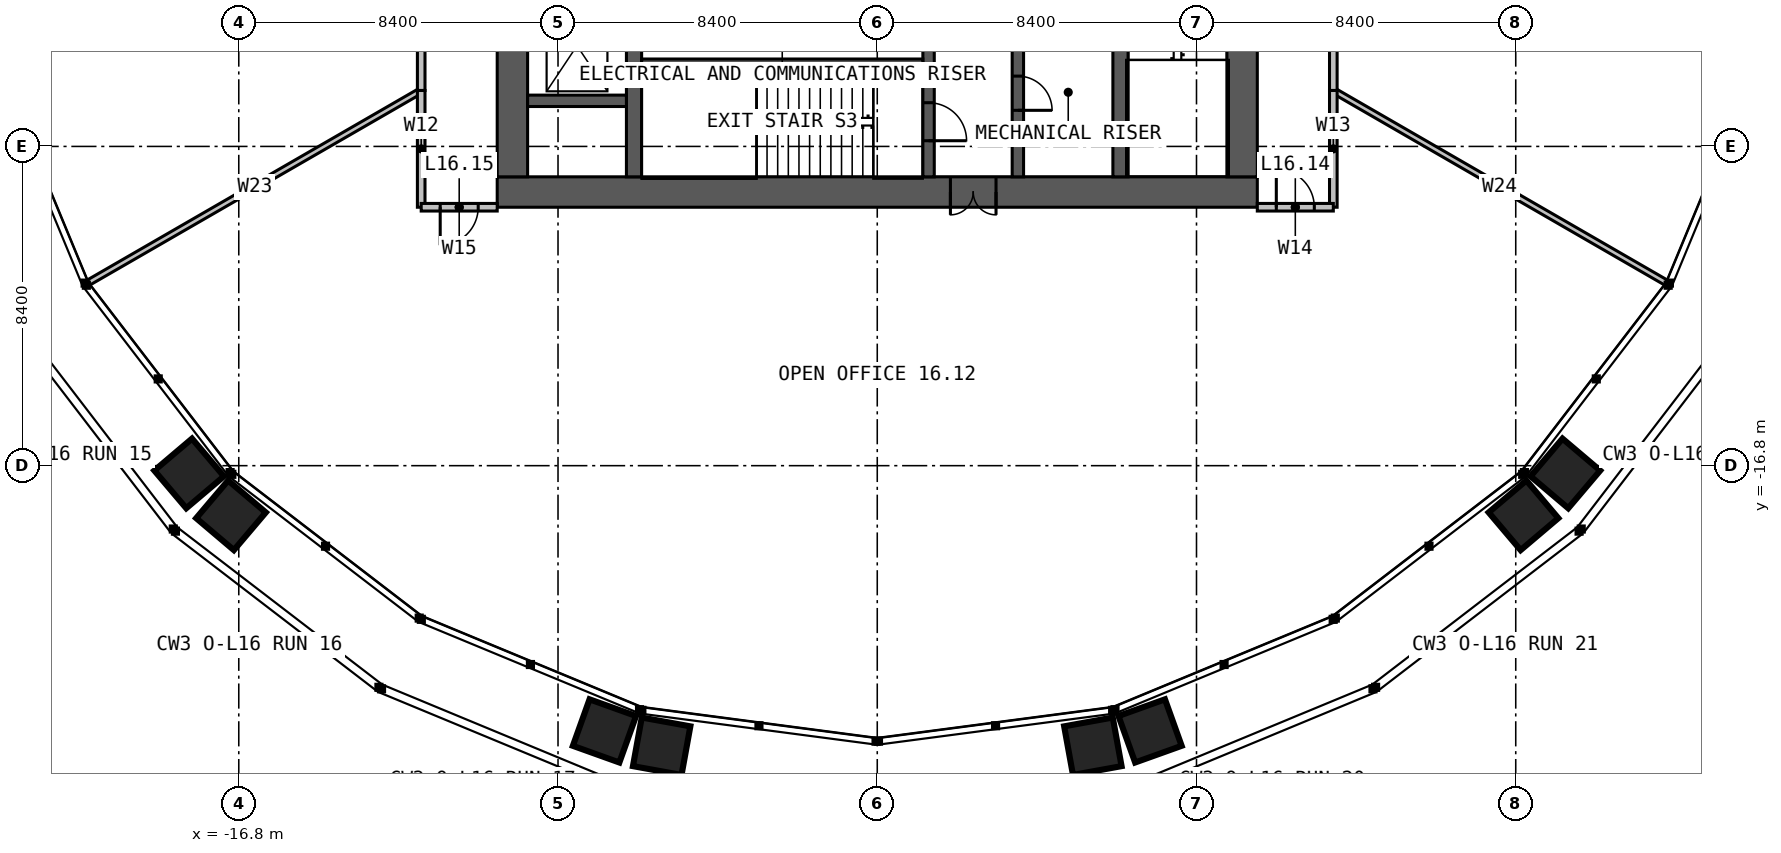
"""IFC4 building model, lengths in metres.
Left out: names, types, materials, properties, quantities, classifications, styles, units other than length and angle.
Written with IfcOpenShell. Run it as: python <this file> out.ifc"""

import sys

from ifc_helpers import new_model, si_unit, direction, frame, frame_2d, origin, place, context, subcontext, project, spatial, rectangle, extrude, element, fill, save


model = new_model("IFC4")
c1 = context("Model", 3, precision=1e-05, world=origin(), true_north=direction((0.0, 1.0)))
c2 = subcontext(c1, "Body", "Model", "MODEL_VIEW")
j1 = project(units=[si_unit("LENGTHUNIT", "METRE"), si_unit("PLANEANGLEUNIT", "RADIAN")], contexts=[c1])
p1 = place(None, origin())
s1 = spatial("IfcSite", under=j1, at=p1, CompositionType="ELEMENT")
p2 = place(p1, origin())
s2 = spatial("IfcBuilding", under=s1, at=p2, CompositionType="ELEMENT")
p3 = place(p2, frame((0.0, 0.0, 69.0)))
s3 = spatial("IfcBuildingStorey", under=s2, at=p3, CompositionType="ELEMENT", Elevation=69.0)
p4 = place(p3, frame((10.0, -9.6, 0.0), z_axis=(0.0, 0.0, 1.0), x_axis=(-1.0, 0.0, 0.0)))
e1 = element("IfcWall", 1, at=p4, inside=s3, PredefinedType="SOLIDWALL", context=c2, shape_type="SweptSolid", body=[
    extrude(rectangle(XDim=20.0, YDim=0.8, at=frame_2d((10.0, 0.0))), origin(), (0.0, 0.0, 1.0), 4.0),
])
p5 = place(p4, frame((6.875, 0.0, 0.0)))
e2 = element("IfcOpeningElement", 2, at=p5, cuts=e1, PredefinedType="OPENING", context=c2, shape_type="SweptSolid", body=[
    extrude(rectangle(XDim=1.2, YDim=2.2, at=frame_2d((0.6, 1.1))), frame((0.0, 0.41, 0.0), z_axis=(0.0, -1.0, 0.0), x_axis=(1.0, 0.0, 0.0)), (0.0, 0.0, 1.0), 0.82),
])
for number, where, z_axis, x_axis in (
    (3, (9.6, -9.2, 0.0), (0.0, 0.0, 1.0), (0.0, 1.0, 0.0)),
    (4, (-9.6, 9.2, 0.0), (0.0, 0.0, 1.0), (0.0, -1.0, 0.0)),
):
    element("IfcWall", number, at=place(p3, frame(where, z_axis=z_axis, x_axis=x_axis)), inside=s3, PredefinedType="SOLIDWALL", context=c2, shape_type="SweptSolid", body=[
        extrude(rectangle(XDim=18.4, YDim=0.8, at=frame_2d((9.2, 0.0))), origin(), (0.0, 0.0, 1.0), 4.0),
    ])
p6 = place(p3, frame((-6.4, -9.2, 0.0), z_axis=(0.0, 0.0, 1.0), x_axis=(0.0, 1.0, 0.0)))
e5 = element("IfcWall", 5, at=p6, inside=s3, PredefinedType="SOLIDWALL", context=c2, shape_type="SweptSolid", body=[
    extrude(rectangle(XDim=18.4, YDim=0.4, at=frame_2d((9.2, 0.0))), origin(), (0.0, 0.0, 1.0), 4.0),
])
p7 = place(p6, frame((8.7, 0.0, 0.0)))
e6 = element("IfcOpeningElement", 6, at=p7, cuts=e5, PredefinedType="OPENING", context=c2, shape_type="SweptSolid", body=[
    extrude(rectangle(XDim=1.0, YDim=2.2, at=frame_2d((0.5, 1.1))), frame((0.0, 0.21, 0.0), z_axis=(0.0, -1.0, 0.0), x_axis=(1.0, 0.0, 0.0)), (0.0, 0.0, 1.0), 0.42),
])
p8 = place(p3, frame((6.4, 9.2, 0.0), z_axis=(0.0, 0.0, 1.0), x_axis=(0.0, -1.0, 0.0)))
e7 = element("IfcWall", 7, at=p8, inside=s3, PredefinedType="SOLIDWALL", context=c2, shape_type="SweptSolid", body=[
    extrude(rectangle(XDim=18.4, YDim=0.4, at=frame_2d((9.2, 0.0))), origin(), (0.0, 0.0, 1.0), 4.0),
])
p9 = place(p8, frame((8.7, 0.0, 0.0)))
e8 = element("IfcOpeningElement", 8, at=p9, cuts=e7, PredefinedType="OPENING", context=c2, shape_type="SweptSolid", body=[
    extrude(rectangle(XDim=1.0, YDim=2.2, at=frame_2d((0.5, 1.1))), frame((0.0, 0.21, 0.0), z_axis=(0.0, -1.0, 0.0), x_axis=(1.0, 0.0, 0.0)), (0.0, 0.0, 1.0), 0.42),
])
p10 = place(p3, frame((1.35, -1.45, 0.0), z_axis=(0.0, 0.0, 1.0), x_axis=(0.0, -1.0, 0.0)))
e9 = element("IfcWall", 9, at=p10, inside=s3, PredefinedType="SOLIDWALL", context=c2, shape_type="SweptSolid", body=[
    extrude(rectangle(XDim=7.75, YDim=0.3, at=frame_2d((3.875, 0.0))), origin(), (0.0, 0.0, 1.0), 4.0),
])
p11 = place(p10, frame((5.8, 0.0, 0.0)))
e10 = element("IfcOpeningElement", 10, at=p11, cuts=e9, PredefinedType="OPENING", context=c2, shape_type="SweptSolid", body=[
    extrude(rectangle(XDim=1.0, YDim=2.2, at=frame_2d((0.5, 1.1))), frame((0.0, 0.16, 0.0), z_axis=(0.0, -1.0, 0.0), x_axis=(1.0, 0.0, 0.0)), (0.0, 0.0, 1.0), 0.32),
])
p12 = place(p10, frame((3.525, 0.0, 0.0)))
e11 = element("IfcOpeningElement", 11, at=p12, cuts=e9, PredefinedType="OPENING", context=c2, shape_type="SweptSolid", body=[
    extrude(rectangle(XDim=0.9, YDim=2.2, at=frame_2d((0.45, 1.1))), frame((0.0, 0.16, 0.0), z_axis=(0.0, -1.0, 0.0), x_axis=(1.0, 0.0, 0.0)), (0.0, 0.0, 1.0), 0.32),
])
p13 = place(p3, frame((3.7, -1.45, 0.0), z_axis=(0.0, 0.0, 1.0), x_axis=(0.0, -1.0, 0.0)))
e12 = element("IfcWall", 12, at=p13, inside=s3, PredefinedType="SOLIDWALL", context=c2, shape_type="SweptSolid", body=[
    extrude(rectangle(XDim=7.75, YDim=0.3, at=frame_2d((3.875, 0.0))), origin(), (0.0, 0.0, 1.0), 4.0),
])
p14 = place(p13, frame((5.1, 0.0, 0.0)))
e13 = element("IfcOpeningElement", 13, at=p14, cuts=e12, PredefinedType="OPENING", context=c2, shape_type="SweptSolid", body=[
    extrude(rectangle(XDim=0.9, YDim=2.2, at=frame_2d((0.45, 1.1))), frame((0.0, 0.16, 0.0), z_axis=(0.0, -1.0, 0.0), x_axis=(1.0, 0.0, 0.0)), (0.0, 0.0, 1.0), 0.32),
])
p15 = place(p3, frame((-6.2, -6.2, 0.0), z_axis=(0.0, 0.0, 1.0), x_axis=(1.0, 0.0, 0.0)))
e14 = element("IfcWall", 14, at=p15, inside=s3, PredefinedType="SOLIDWALL", context=c2, shape_type="SweptSolid", body=[
    extrude(rectangle(XDim=7.4, YDim=0.2, at=frame_2d((3.7, 0.0))), origin(), (0.0, 0.0, 1.0), 4.0),
])
p16 = place(p3, frame((-9.2, -7.2, 0.0), z_axis=(0.0, 0.0, 1.0), x_axis=(1.0, 0.0, 0.0)))
e15 = element("IfcWall", 15, at=p16, inside=s3, PredefinedType="SOLIDWALL", context=c2, shape_type="SweptSolid", body=[
    extrude(rectangle(XDim=2.6, YDim=0.3, at=frame_2d((1.3, 0.0))), origin(), (0.0, 0.0, 1.0), 4.0),
])
for number, where, z_axis, x_axis in (
    (16, (12.0, -6.928, 0.0), (0.0, 0.0, 1.0), (0.866, -0.5, 0.0)),
    (17, (-12.0, -6.928, 0.0), (0.0, 0.0, 1.0), (-0.866, -0.5, 0.0)),
):
    element("IfcWall", number, at=place(p3, frame(where, z_axis=z_axis, x_axis=x_axis)), inside=s3, PredefinedType="PARTITIONING", context=c2, shape_type="SweptSolid", body=[
        extrude(rectangle(XDim=10.106, YDim=0.15, at=frame_2d((5.053, 0.0))), origin(), (0.0, 0.0, 1.0), 2.79),
    ])
p17 = place(p3, frame((12.0, -6.928, 0.0), z_axis=(0.0, 0.0, 1.0), x_axis=(0.0, 1.0, 0.0)))
e18 = element("IfcWall", 18, at=p17, inside=s3, PredefinedType="PARTITIONING", context=c2, shape_type="SweptSolid", body=[
    extrude(rectangle(XDim=10.144, YDim=0.2, at=frame_2d((5.072, 0.0))), origin(), (0.0, 0.0, 1.0), 3.8),
])
p18 = place(p17, frame((4.172, 0.0, 0.0)))
e19 = element("IfcOpeningElement", 19, at=p18, cuts=e18, PredefinedType="OPENING", context=c2, shape_type="SweptSolid", body=[
    extrude(rectangle(XDim=1.8, YDim=2.2, at=frame_2d((0.9, 1.1))), frame((0.0, 0.11, 0.0), z_axis=(0.0, -1.0, 0.0), x_axis=(1.0, 0.0, 0.0)), (0.0, 0.0, 1.0), 0.22),
])
p19 = place(p3, frame((-12.0, 6.928, 0.0), z_axis=(0.0, 0.0, 1.0), x_axis=(0.0, -1.0, 0.0)))
e20 = element("IfcWall", 20, at=p19, inside=s3, PredefinedType="PARTITIONING", context=c2, shape_type="SweptSolid", body=[
    extrude(rectangle(XDim=13.856, YDim=0.2, at=frame_2d((6.928, 0.0))), origin(), (0.0, 0.0, 1.0), 3.8),
])
p20 = place(p19, frame((6.028, 0.0, 0.0)))
e21 = element("IfcOpeningElement", 21, at=p20, cuts=e20, PredefinedType="OPENING", context=c2, shape_type="SweptSolid", body=[
    extrude(rectangle(XDim=1.8, YDim=2.2, at=frame_2d((0.9, 1.1))), frame((0.0, 0.11, 0.0), z_axis=(0.0, -1.0, 0.0), x_axis=(1.0, 0.0, 0.0)), (0.0, 0.0, 1.0), 0.22),
])
for number, where, z_axis, x_axis in (
    (22, (-12.0, -6.928, 0.0), (0.0, 0.0, 1.0), (0.0, -1.0, 0.0)),
    (23, (12.0, -10.0, 0.0), (0.0, 0.0, 1.0), (0.0, 1.0, 0.0)),
):
    element("IfcWall", number, at=place(p3, frame(where, z_axis=z_axis, x_axis=x_axis)), inside=s3, PredefinedType="PARTITIONING", context=c2, shape_type="SweptSolid", body=[
        extrude(rectangle(XDim=3.072, YDim=0.2, at=frame_2d((1.536, 0.0))), origin(), (0.0, 0.0, 1.0), 3.8),
    ])
p21 = place(p3, frame((10.0, -10.0, 0.0), z_axis=(0.0, 0.0, 1.0), x_axis=(1.0, 0.0, 0.0)))
e24 = element("IfcWall", 24, at=p21, inside=s3, PredefinedType="PARTITIONING", context=c2, shape_type="SweptSolid", body=[
    extrude(rectangle(XDim=2.0, YDim=0.2, at=frame_2d((1.0, 0.0))), origin(), (0.0, 0.0, 1.0), 3.8),
])
p22 = place(p21, frame((0.5, 0.0, 0.0)))
e25 = element("IfcOpeningElement", 25, at=p22, cuts=e24, PredefinedType="OPENING", context=c2, shape_type="SweptSolid", body=[
    extrude(rectangle(XDim=1.0, YDim=2.2, at=frame_2d((0.5, 1.1))), frame((0.0, 0.11, 0.0), z_axis=(0.0, -1.0, 0.0), x_axis=(1.0, 0.0, 0.0)), (0.0, 0.0, 1.0), 0.22),
])
p23 = place(p3, frame((-10.0, -10.0, 0.0), z_axis=(0.0, 0.0, 1.0), x_axis=(-1.0, 0.0, 0.0)))
e26 = element("IfcWall", 26, at=p23, inside=s3, PredefinedType="PARTITIONING", context=c2, shape_type="SweptSolid", body=[
    extrude(rectangle(XDim=2.0, YDim=0.2, at=frame_2d((1.0, 0.0))), origin(), (0.0, 0.0, 1.0), 3.8),
])
p24 = place(p23, frame((0.5, 0.0, 0.0)))
e27 = element("IfcOpeningElement", 27, at=p24, cuts=e26, PredefinedType="OPENING", context=c2, shape_type="SweptSolid", body=[
    extrude(rectangle(XDim=1.0, YDim=2.2, at=frame_2d((0.5, 1.1))), frame((0.0, 0.11, 0.0), z_axis=(0.0, -1.0, 0.0), x_axis=(1.0, 0.0, 0.0)), (0.0, 0.0, 1.0), 0.22),
])
p25 = place(p5, origin())
e28 = element("IfcDoor", 28, at=p25, inside=s3, OperationType="DOUBLE_DOOR_SINGLE_SWING", PredefinedType="DOOR", context=c2, shape_type="SweptSolid", body=[
    extrude(rectangle(XDim=1.2, YDim=2.2, at=frame_2d((0.6, 1.1))), frame((0.0, 0.025, 0.0), z_axis=(0.0, -1.0, 0.0), x_axis=(1.0, 0.0, 0.0)), (0.0, 0.0, 1.0), 0.05),
])
fill(e2, e28)
p26 = place(p11, origin())
e29 = element("IfcDoor", 29, at=p26, inside=s3, OperationType="SINGLE_SWING_RIGHT", PredefinedType="DOOR", context=c2, shape_type="SweptSolid", body=[
    extrude(rectangle(XDim=1.0, YDim=2.2, at=frame_2d((0.5, 1.1))), frame((0.0, 0.025, 0.0), z_axis=(0.0, -1.0, 0.0), x_axis=(1.0, 0.0, 0.0)), (0.0, 0.0, 1.0), 0.05),
])
fill(e10, e29)
p27 = place(p14, origin())
e30 = element("IfcDoor", 30, at=p27, inside=s3, OperationType="SINGLE_SWING_RIGHT", PredefinedType="DOOR", context=c2, shape_type="SweptSolid", body=[
    extrude(rectangle(XDim=0.9, YDim=2.2, at=frame_2d((0.45, 1.1))), frame((0.0, 0.025, 0.0), z_axis=(0.0, -1.0, 0.0), x_axis=(1.0, 0.0, 0.0)), (0.0, 0.0, 1.0), 0.05),
])
fill(e13, e30)
p28 = place(p22, origin())
e31 = element("IfcDoor", 31, at=p28, inside=s3, OperationType="SINGLE_SWING_LEFT", PredefinedType="DOOR", context=c2, shape_type="SweptSolid", body=[
    extrude(rectangle(XDim=1.0, YDim=2.2, at=frame_2d((0.5, 1.1))), frame((0.0, 0.025, 0.0), z_axis=(0.0, -1.0, 0.0), x_axis=(1.0, 0.0, 0.0)), (0.0, 0.0, 1.0), 0.05),
])
fill(e25, e31)
p29 = place(p24, origin())
e32 = element("IfcDoor", 32, at=p29, inside=s3, OperationType="SINGLE_SWING_RIGHT", PredefinedType="DOOR", context=c2, shape_type="SweptSolid", body=[
    extrude(rectangle(XDim=1.0, YDim=2.2, at=frame_2d((0.5, 1.1))), frame((0.0, 0.025, 0.0), z_axis=(0.0, -1.0, 0.0), x_axis=(1.0, 0.0, 0.0)), (0.0, 0.0, 1.0), 0.05),
])
fill(e27, e32)
save(model, sys.argv[1])
